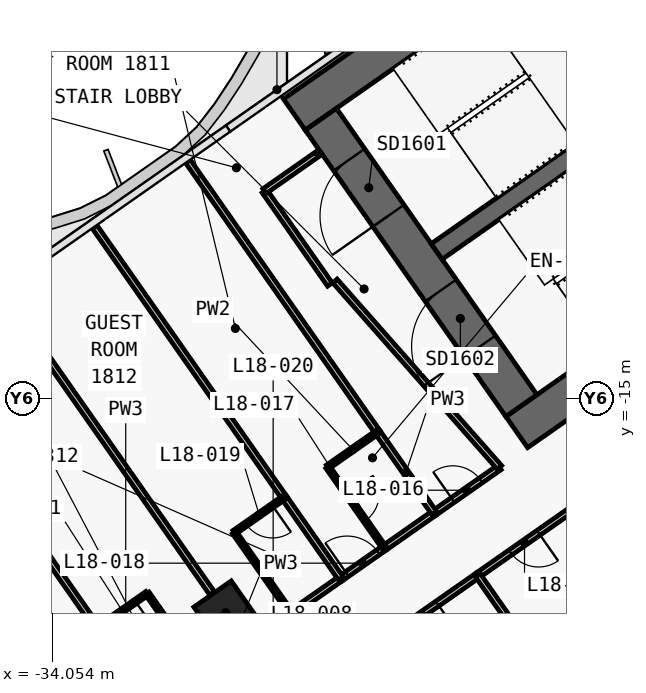
"""IFC4 building model, lengths in metres.
Left out: names, types, materials, properties, quantities, classifications, styles, units other than length and angle.
Written with IfcOpenShell. Run it as: python <this file> out.ifc"""

import sys

from ifc_helpers import new_model, si_unit, direction, frame, frame_2d, origin, origin_2d, place, context, subcontext, project, spatial, polyline, rectangle, outline, extrude, element, fill, save


model = new_model("IFC4")
c1 = context("Model", 3, precision=1e-05, world=origin(), true_north=direction((0.0, 1.0)))
c2 = subcontext(c1, "Body", "Model", "MODEL_VIEW")
j1 = project(units=[si_unit("LENGTHUNIT", "METRE"), si_unit("PLANEANGLEUNIT", "RADIAN")], contexts=[c1])
p1 = place(None, origin())
s1 = spatial("IfcSite", under=j1, at=p1, CompositionType="ELEMENT")
p2 = place(p1, origin())
s2 = spatial("IfcBuilding", under=s1, at=p2, CompositionType="ELEMENT")
p3 = place(p2, frame((0.0, 0.0, 90.5)))
s3 = spatial("IfcBuildingStorey", under=s2, at=p3, CompositionType="ELEMENT", Elevation=90.5)
p4 = place(p3, frame((0.037, 11.867, 0.0), z_axis=(0.0, 0.0, 1.0), x_axis=(-0.819155306259, -0.573571777746, 0.0)))
e1 = element("IfcWall", 1, at=p4, inside=s3, PredefinedType="SHEAR", context=c2, shape_type="SweptSolid", body=[
    extrude(outline(polyline([(33.837, 0.5), (0.7, 0.5), (0.0, -0.5), (33.837, -0.5), (33.837, 0.5)])), origin(), (0.0, 0.0, 1.0), 3.6),
])
p5 = place(p3, frame((0.037, -0.585, 0.0), z_axis=(0.0, 0.0, 1.0), x_axis=(-0.819157152511, -0.573569140985, 0.0)))
e2 = element("IfcWall", 2, at=p5, inside=s3, PredefinedType="SHEAR", context=c2, shape_type="SweptSolid", body=[
    extrude(outline(polyline([(26.695, 0.5), (0.7, 0.5), (0.0, -0.5), (26.695, -0.5), (26.695, 0.5)])), origin(), (0.0, 0.0, 1.0), 3.6),
])
p6 = place(p5, frame((2.995, 0.0, 0.0)))
e3 = element("IfcOpeningElement", 3, at=p6, cuts=e2, PredefinedType="OPENING", context=c2, shape_type="SweptSolid", body=[
    extrude(rectangle(XDim=2.4, YDim=2.1, at=frame_2d((1.2, 1.05))), frame((0.0, 0.51, 0.0), z_axis=(0.0, -1.0, 0.0), x_axis=(1.0, 0.0, 0.0)), (0.0, 0.0, 1.0), 1.02),
])
p7 = place(p5, frame((11.995, 0.0, 0.0)))
e4 = element("IfcOpeningElement", 4, at=p7, cuts=e2, PredefinedType="OPENING", context=c2, shape_type="SweptSolid", body=[
    extrude(rectangle(XDim=2.4, YDim=2.1, at=frame_2d((1.2, 1.05))), frame((0.0, 0.51, 0.0), z_axis=(0.0, -1.0, 0.0), x_axis=(1.0, 0.0, 0.0)), (0.0, 0.0, 1.0), 1.02),
])
p8 = place(p3, frame((-21.708, -15.2, 0.0), z_axis=(0.0, 0.0, 1.0), x_axis=(-0.573576324356, 0.819152122709, 0.0)))
e5 = element("IfcWall", 5, at=p8, inside=s3, PredefinedType="SHEAR", context=c2, shape_type="SweptSolid", body=[
    extrude(outline(polyline([(0.0, 0.5), (0.0, -0.5), (9.2, -0.5), (9.2, 0.5), (0.0, 0.5)])), origin(), (0.0, 0.0, 1.0), 3.6),
])
p9 = place(p8, frame((6.1, 0.0, 0.0)))
e6 = element("IfcOpeningElement", 6, at=p9, cuts=e5, PredefinedType="OPENING", context=c2, shape_type="SweptSolid", body=[
    extrude(rectangle(XDim=1.8, YDim=2.1, at=frame_2d((0.9, 1.05))), frame((0.0, 0.51, 0.0), z_axis=(0.0, -1.0, 0.0), x_axis=(1.0, 0.0, 0.0)), (0.0, 0.0, 1.0), 1.02),
])
p10 = place(p8, frame((1.9, 0.0, 0.0)))
e7 = element("IfcOpeningElement", 7, at=p10, cuts=e5, PredefinedType="OPENING", context=c2, shape_type="SweptSolid", body=[
    extrude(rectangle(XDim=1.8, YDim=2.1, at=frame_2d((0.9, 1.05))), frame((0.0, 0.51, 0.0), z_axis=(0.0, -1.0, 0.0), x_axis=(1.0, 0.0, 0.0)), (0.0, 0.0, 1.0), 1.02),
])
p11 = place(p3, frame((-2.638, 3.768, 0.0), z_axis=(0.0, 0.0, 1.0), x_axis=(-0.819148977158, -0.573580816643, 0.0)))
e8 = element("IfcWall", 8, at=p11, inside=s3, PredefinedType="SHEAR", context=c2, shape_type="SweptSolid", body=[
    extrude(outline(polyline([(26.0, 0.25), (0.0, 0.25), (0.0, -0.25), (26.0, -0.25), (26.0, 0.25)])), origin(), (0.0, 0.0, 1.0), 3.6),
])
p12 = place(p11, frame((1.169, 0.0, 0.0)))
e9 = element("IfcOpeningElement", 9, at=p12, cuts=e8, PredefinedType="OPENING", context=c2, shape_type="SweptSolid", body=[
    extrude(rectangle(XDim=1.1, YDim=2.1, at=frame_2d((0.55, 1.05))), frame((0.0, 0.26, 0.0), z_axis=(0.0, -1.0, 0.0), x_axis=(1.0, 0.0, 0.0)), (0.0, 0.0, 1.0), 0.52),
])
p13 = place(p11, frame((3.206, 0.0, 0.0)))
e10 = element("IfcOpeningElement", 10, at=p13, cuts=e8, PredefinedType="OPENING", context=c2, shape_type="SweptSolid", body=[
    extrude(rectangle(XDim=1.1, YDim=2.1, at=frame_2d((0.55, 1.05))), frame((0.0, 0.26, 0.0), z_axis=(0.0, -1.0, 0.0), x_axis=(1.0, 0.0, 0.0)), (0.0, 0.0, 1.0), 0.52),
])
p14 = place(p11, frame((5.244, 0.0, 0.0)))
e11 = element("IfcOpeningElement", 11, at=p14, cuts=e8, PredefinedType="OPENING", context=c2, shape_type="SweptSolid", body=[
    extrude(rectangle(XDim=1.1, YDim=2.1, at=frame_2d((0.55, 1.05))), frame((0.0, 0.26, 0.0), z_axis=(0.0, -1.0, 0.0), x_axis=(1.0, 0.0, 0.0)), (0.0, 0.0, 1.0), 0.52),
])
p15 = place(p11, frame((7.281, 0.0, 0.0)))
e12 = element("IfcOpeningElement", 12, at=p15, cuts=e8, PredefinedType="OPENING", context=c2, shape_type="SweptSolid", body=[
    extrude(rectangle(XDim=1.1, YDim=2.1, at=frame_2d((0.55, 1.05))), frame((0.0, 0.26, 0.0), z_axis=(0.0, -1.0, 0.0), x_axis=(1.0, 0.0, 0.0)), (0.0, 0.0, 1.0), 0.52),
])
p16 = place(p11, frame((9.688, 0.0, 0.0)))
e13 = element("IfcOpeningElement", 13, at=p16, cuts=e8, PredefinedType="OPENING", context=c2, shape_type="SweptSolid", body=[
    extrude(rectangle(XDim=1.1, YDim=2.1, at=frame_2d((0.55, 1.05))), frame((0.0, 0.26, 0.0), z_axis=(0.0, -1.0, 0.0), x_axis=(1.0, 0.0, 0.0)), (0.0, 0.0, 1.0), 0.52),
])
p17 = place(p11, frame((11.863, 0.0, 0.0)))
e14 = element("IfcOpeningElement", 14, at=p17, cuts=e8, PredefinedType="OPENING", context=c2, shape_type="SweptSolid", body=[
    extrude(rectangle(XDim=1.1, YDim=2.1, at=frame_2d((0.55, 1.05))), frame((0.0, 0.26, 0.0), z_axis=(0.0, -1.0, 0.0), x_axis=(1.0, 0.0, 0.0)), (0.0, 0.0, 1.0), 0.52),
])
p18 = place(p11, frame((14.038, 0.0, 0.0)))
e15 = element("IfcOpeningElement", 15, at=p18, cuts=e8, PredefinedType="OPENING", context=c2, shape_type="SweptSolid", body=[
    extrude(rectangle(XDim=1.1, YDim=2.1, at=frame_2d((0.55, 1.05))), frame((0.0, 0.26, 0.0), z_axis=(0.0, -1.0, 0.0), x_axis=(1.0, 0.0, 0.0)), (0.0, 0.0, 1.0), 0.52),
])
p19 = place(p11, frame((16.212, 0.0, 0.0)))
e16 = element("IfcOpeningElement", 16, at=p19, cuts=e8, PredefinedType="OPENING", context=c2, shape_type="SweptSolid", body=[
    extrude(rectangle(XDim=1.1, YDim=2.1, at=frame_2d((0.55, 1.05))), frame((0.0, 0.26, 0.0), z_axis=(0.0, -1.0, 0.0), x_axis=(1.0, 0.0, 0.0)), (0.0, 0.0, 1.0), 0.52),
])
p20 = place(p3, frame((-29.49, -20.649, 0.0), z_axis=(0.0, 0.0, 1.0), x_axis=(-0.819152044289, -0.573576436351, 0.0)))
e17 = element("IfcColumn", 17, at=p20, inside=s3, PredefinedType="COLUMN", context=c2, shape_type="SweptSolid", body=[
    extrude(rectangle(XDim=1.2, YDim=1.2, at=origin_2d()), origin(), (0.0, 0.0, 1.0), 3.6),
])
p21 = place(p3, frame((-24.003, -18.028, 0.0), z_axis=(0.0, 0.0, 1.0), x_axis=(0.819160859995, 0.573563846013, 0.0)))
e18 = element("IfcWall", 18, at=p21, inside=s3, PredefinedType="PARTITIONING", context=c2, shape_type="SweptSolid", body=[
    extrude(rectangle(XDim=2.098, YDim=0.15, at=frame_2d((1.049, 0.0))), origin(), (0.0, 0.0, 1.0), 3.32),
])
p22 = place(p21, frame((0.599, 0.0, 0.0)))
e19 = element("IfcOpeningElement", 19, at=p22, cuts=e18, PredefinedType="OPENING", context=c2, shape_type="SweptSolid", body=[
    extrude(rectangle(XDim=0.9, YDim=2.1, at=frame_2d((0.45, 1.05))), frame((0.0, 0.085, 0.0), z_axis=(0.0, -1.0, 0.0), x_axis=(1.0, 0.0, 0.0)), (0.0, 0.0, 1.0), 0.17),
])
p23 = place(p3, frame((-26.46, -19.748, 0.0), z_axis=(0.0, 0.0, 1.0), x_axis=(0.819199220913, 0.573509055252, 0.0)))
e20 = element("IfcWall", 20, at=p23, inside=s3, PredefinedType="PARTITIONING", context=c2, shape_type="SweptSolid", body=[
    extrude(rectangle(XDim=1.403, YDim=0.15, at=frame_2d((0.702, 0.0))), origin(), (0.0, 0.0, 1.0), 3.32),
])
p24 = place(p23, frame((0.202, 0.0, 0.0)))
e21 = element("IfcOpeningElement", 21, at=p24, cuts=e20, PredefinedType="OPENING", context=c2, shape_type="SweptSolid", body=[
    extrude(rectangle(XDim=1.0, YDim=2.1, at=frame_2d((0.5, 1.05))), frame((0.0, 0.085, 0.0), z_axis=(0.0, -1.0, 0.0), x_axis=(1.0, 0.0, 0.0)), (0.0, 0.0, 1.0), 0.17),
])
p25 = place(p3, frame((-25.313, -18.945, 0.0), z_axis=(0.0, 0.0, 1.0), x_axis=(0.819189013667, 0.573523634986, 0.0)))
e22 = element("IfcWall", 22, at=p25, inside=s3, PredefinedType="PARTITIONING", context=c2, shape_type="SweptSolid", body=[
    extrude(rectangle(XDim=1.604, YDim=0.15, at=frame_2d((0.802, 0.0))), origin(), (0.0, 0.0, 1.0), 3.32),
])
p26 = place(p3, frame((-27.768, -20.664, 0.0), z_axis=(0.0, 0.0, 1.0), x_axis=(-0.81914197737, -0.573590813132, 0.0)))
e23 = element("IfcWall", 23, at=p26, inside=s3, PredefinedType="PARTITIONING", context=c2, shape_type="SweptSolid", body=[
    extrude(rectangle(XDim=1.403, YDim=0.15, at=frame_2d((0.701, 0.0))), origin(), (0.0, 0.0, 1.0), 2.6),
])
p27 = place(p26, frame((0.15, 0.0, 0.0)))
e24 = element("IfcOpeningElement", 24, at=p27, cuts=e23, PredefinedType="OPENING", context=c2, shape_type="SweptSolid", body=[
    extrude(rectangle(XDim=0.85, YDim=2.1, at=frame_2d((0.425, 1.05))), frame((0.0, 0.085, 0.0), z_axis=(0.0, -1.0, 0.0), x_axis=(1.0, 0.0, 0.0)), (0.0, 0.0, 1.0), 0.17),
])
p28 = place(p3, frame((-27.771, -20.666, 0.0), z_axis=(0.0, 0.0, 1.0), x_axis=(0.819189013667, 0.573523634986, 0.0)))
e25 = element("IfcWall", 25, at=p28, inside=s3, PredefinedType="PARTITIONING", context=c2, shape_type="SweptSolid", body=[
    extrude(rectangle(XDim=1.604, YDim=0.15, at=frame_2d((0.802, 0.0))), origin(), (0.0, 0.0, 1.0), 3.32),
])
p29 = place(p3, frame((-20.395, -17.943, 0.0), z_axis=(0.0, 0.0, 1.0), x_axis=(-0.819128818764, -0.573609604409, 0.0)))
e26 = element("IfcWall", 26, at=p29, inside=s3, PredefinedType="PARTITIONING", context=c2, shape_type="SweptSolid", body=[
    extrude(rectangle(XDim=3.004, YDim=0.15, at=frame_2d((1.502, 0.0))), origin(), (0.0, 0.0, 1.0), 2.6),
])
p30 = place(p29, frame((1.052, 0.0, 0.0)))
e27 = element("IfcOpeningElement", 27, at=p30, cuts=e26, PredefinedType="OPENING", context=c2, shape_type="SweptSolid", body=[
    extrude(rectangle(XDim=0.9, YDim=2.1, at=frame_2d((0.45, 1.05))), frame((0.0, 0.085, 0.0), z_axis=(0.0, -1.0, 0.0), x_axis=(1.0, 0.0, 0.0)), (0.0, 0.0, 1.0), 0.17),
])
p31 = place(p3, frame((-22.852, -19.664, 0.0), z_axis=(0.0, 0.0, 1.0), x_axis=(-0.819145961204, -0.573585123798, 0.0)))
e28 = element("IfcWall", 28, at=p31, inside=s3, PredefinedType="PARTITIONING", context=c2, shape_type="SweptSolid", body=[
    extrude(rectangle(XDim=3.603, YDim=0.15, at=frame_2d((1.802, 0.0))), origin(), (0.0, 0.0, 1.0), 3.32),
])
p32 = place(p31, frame((1.302, 0.0, 0.0)))
e29 = element("IfcOpeningElement", 29, at=p32, cuts=e28, PredefinedType="OPENING", context=c2, shape_type="SweptSolid", body=[
    extrude(rectangle(XDim=1.0, YDim=2.1, at=frame_2d((0.5, 1.05))), frame((0.0, 0.085, 0.0), z_axis=(0.0, -1.0, 0.0), x_axis=(1.0, 0.0, 0.0)), (0.0, 0.0, 1.0), 0.17),
])
p33 = place(p3, frame((-26.746, -12.014, 0.0), z_axis=(0.0, 0.0, 1.0), x_axis=(-0.573560650686, 0.819163097304, 0.0)))
e30 = element("IfcWall", 30, at=p33, inside=s3, PredefinedType="PARTITIONING", context=c2, shape_type="SweptSolid", body=[
    extrude(rectangle(XDim=3.0, YDim=0.15, at=frame_2d((1.5, 0.0))), origin(), (0.0, 0.0, 1.0), 3.32),
])
p34 = place(p3, frame((-28.467, -9.556, 0.0), z_axis=(0.0, 0.0, 1.0), x_axis=(0.819109000826, 0.573637903879, 0.0)))
e31 = element("IfcWall", 31, at=p34, inside=s3, PredefinedType="PARTITIONING", context=c2, shape_type="SweptSolid", body=[
    extrude(rectangle(XDim=1.68, YDim=0.15, at=frame_2d((0.84, 0.0))), origin(), (0.0, 0.0, 1.0), 3.32),
])
p35 = place(p3, frame((-22.284, -16.827, 0.0), z_axis=(0.0, 0.0, 1.0), x_axis=(-0.661545117561, 0.749905365651, 0.0)))
e32 = element("IfcWall", 32, at=p35, inside=s3, PredefinedType="PARTITIONING", context=c2, shape_type="SweptSolid", body=[
    extrude(rectangle(XDim=6.543, YDim=0.15, at=frame_2d((3.271, 0.0))), origin(), (0.0, 0.0, 1.0), 2.6),
])
p36 = place(p3, frame((-25.492, -15.897, 0.0), z_axis=(0.0, 0.0, 1.0), x_axis=(-0.573579093502, 0.819150183725, 0.0)))
e33 = element("IfcWall", 33, at=p36, inside=s3, PredefinedType="PARTITIONING", context=c2, shape_type="SweptSolid", body=[
    extrude(rectangle(XDim=8.701, YDim=0.15, at=frame_2d((4.351, 0.0))), origin(), (0.0, 0.0, 1.0), 2.6),
])
p37 = place(p3, frame((-24.001, -18.026, 0.0), z_axis=(0.0, 0.0, 1.0), x_axis=(-0.573588285102, 0.819143747577, 0.0)))
e34 = element("IfcWall", 34, at=p37, inside=s3, PredefinedType="PARTITIONING", context=c2, shape_type="SweptSolid", body=[
    extrude(rectangle(XDim=2.602, YDim=0.15, at=frame_2d((1.301, 0.0))), origin(), (0.0, 0.0, 1.0), 2.6),
])
p38 = place(p3, frame((-25.493, -15.896, 0.0), z_axis=(0.0, 0.0, 1.0), x_axis=(-0.819059844958, -0.573708088123, 0.0)))
e35 = element("IfcWall", 35, at=p38, inside=s3, PredefinedType="PARTITIONING", context=c2, shape_type="SweptSolid", body=[
    extrude(rectangle(XDim=1.6, YDim=0.12, at=frame_2d((0.8, 0.0))), origin(), (0.0, 0.0, 1.0), 3.32),
])
p39 = place(p3, frame((-26.804, -16.815, 0.0), z_axis=(0.0, 0.0, 1.0), x_axis=(0.573582085028, -0.819148089014, 0.0)))
e36 = element("IfcWall", 36, at=p39, inside=s3, PredefinedType="PARTITIONING", context=c2, shape_type="SweptSolid", body=[
    extrude(rectangle(XDim=2.6, YDim=0.12, at=frame_2d((1.3, 0.0))), origin(), (0.0, 0.0, 1.0), 2.6),
])
p40 = place(p39, frame((0.875, 0.0, 0.0)))
e37 = element("IfcOpeningElement", 37, at=p40, cuts=e36, PredefinedType="OPENING", context=c2, shape_type="SweptSolid", body=[
    extrude(rectangle(XDim=0.85, YDim=2.05, at=frame_2d((0.425, 1.025))), frame((0.0, 0.07, 0.0), z_axis=(0.0, -1.0, 0.0), x_axis=(1.0, 0.0, 0.0)), (0.0, 0.0, 1.0), 0.14),
])
p41 = place(p3, frame((-27.949, -17.618, 0.0), z_axis=(0.0, 0.0, 1.0), x_axis=(-0.573579093502, 0.819150183725, 0.0)))
e38 = element("IfcWall", 38, at=p41, inside=s3, PredefinedType="PARTITIONING", context=c2, shape_type="SweptSolid", body=[
    extrude(rectangle(XDim=8.701, YDim=0.15, at=frame_2d((4.351, 0.0))), origin(), (0.0, 0.0, 1.0), 2.6),
])
p42 = place(p3, frame((-26.458, -19.747, 0.0), z_axis=(0.0, 0.0, 1.0), x_axis=(-0.573544201094, 0.819174614714, 0.0)))
e39 = element("IfcWall", 39, at=p42, inside=s3, PredefinedType="PARTITIONING", context=c2, shape_type="SweptSolid", body=[
    extrude(rectangle(XDim=2.602, YDim=0.15, at=frame_2d((1.301, 0.0))), origin(), (0.0, 0.0, 1.0), 2.6),
])
p43 = place(p3, frame((-27.95, -17.617, 0.0), z_axis=(0.0, 0.0, 1.0), x_axis=(-0.819253425856, -0.573431621227, 0.0)))
e40 = element("IfcWall", 40, at=p43, inside=s3, PredefinedType="PARTITIONING", context=c2, shape_type="SweptSolid", body=[
    extrude(rectangle(XDim=1.6, YDim=0.12, at=frame_2d((0.8, 0.0))), origin(), (0.0, 0.0, 1.0), 3.32),
])
p44 = place(p43, frame((0.375, 0.0, 0.0)))
e41 = element("IfcOpeningElement", 41, at=p44, cuts=e40, PredefinedType="OPENING", context=c2, shape_type="SweptSolid", body=[
    extrude(rectangle(XDim=0.85, YDim=2.05, at=frame_2d((0.425, 1.025))), frame((0.0, 0.07, 0.0), z_axis=(0.0, -1.0, 0.0), x_axis=(1.0, 0.0, 0.0)), (0.0, 0.0, 1.0), 0.14),
])
p45 = place(p3, frame((-29.261, -18.536, 0.0), z_axis=(0.0, 0.0, 1.0), x_axis=(0.573537965655, -0.819178980414, 0.0)))
e42 = element("IfcWall", 42, at=p45, inside=s3, PredefinedType="PARTITIONING", context=c2, shape_type="SweptSolid", body=[
    extrude(rectangle(XDim=2.6, YDim=0.12, at=frame_2d((1.3, 0.0))), origin(), (0.0, 0.0, 1.0), 2.6),
])
p46 = place(p3, frame((-29.845, -20.141, 0.0), z_axis=(0.0, 0.0, 1.0), x_axis=(-0.573558725113, 0.819164445546, 0.0)))
e43 = element("IfcWall", 43, at=p46, inside=s3, PredefinedType="PARTITIONING", context=c2, shape_type="SweptSolid", body=[
    extrude(rectangle(XDim=9.01, YDim=0.15, at=frame_2d((4.505, 0.0))), origin(), (0.0, 0.0, 1.0), 2.6),
])
p47 = place(p3, frame((-30.062, -22.27, 0.0), z_axis=(0.0, 0.0, 1.0), x_axis=(-0.573537965655, 0.819178980414, 0.0)))
e44 = element("IfcWall", 44, at=p47, inside=s3, PredefinedType="PARTITIONING", context=c2, shape_type="SweptSolid", body=[
    extrude(rectangle(XDim=2.6, YDim=0.12, at=frame_2d((1.3, 0.0))), origin(), (0.0, 0.0, 1.0), 2.6),
])
p48 = place(p3, frame((-31.555, -20.14, 0.0), z_axis=(0.0, 0.0, 1.0), x_axis=(-0.819131543282, -0.57360571371, 0.0)))
e45 = element("IfcWall", 45, at=p48, inside=s3, PredefinedType="PARTITIONING", context=c2, shape_type="SweptSolid", body=[
    extrude(rectangle(XDim=1.6, YDim=0.12, at=frame_2d((0.8, 0.0))), origin(), (0.0, 0.0, 1.0), 3.32),
])
p49 = place(p48, frame((0.375, 0.0, 0.0)))
e46 = element("IfcOpeningElement", 46, at=p49, cuts=e45, PredefinedType="OPENING", context=c2, shape_type="SweptSolid", body=[
    extrude(rectangle(XDim=0.85, YDim=2.05, at=frame_2d((0.425, 1.025))), frame((0.0, 0.07, 0.0), z_axis=(0.0, -1.0, 0.0), x_axis=(1.0, 0.0, 0.0)), (0.0, 0.0, 1.0), 0.14),
])
p50 = place(p3, frame((-32.979, -20.896, 0.0), z_axis=(0.0, 0.0, 1.0), x_axis=(-0.573576058406, 0.819152308929, 0.0)))
e47 = element("IfcWall", 47, at=p50, inside=s3, PredefinedType="PARTITIONING", context=c2, shape_type="SweptSolid", body=[
    extrude(rectangle(XDim=8.501, YDim=0.15, at=frame_2d((4.25, 0.0))), origin(), (0.0, 0.0, 1.0), 2.5),
])
p51 = place(p3, frame((-18.667, -25.645, 0.0), z_axis=(0.0, 0.0, 1.0), x_axis=(-0.573572324301, 0.819154923562, 0.0)))
e48 = element("IfcWall", 48, at=p51, inside=s3, PredefinedType="PARTITIONING", context=c2, shape_type="SweptSolid", body=[
    extrude(rectangle(XDim=7.3, YDim=0.15, at=frame_2d((3.65, 0.0))), origin(), (0.0, 0.0, 1.0), 2.5),
])
p52 = place(p9, origin())
e49 = element("IfcDoor", 49, at=p52, inside=s3, OperationType="DOUBLE_DOOR_SINGLE_SWING", PredefinedType="DOOR", context=c2, shape_type="SweptSolid", body=[
    extrude(rectangle(XDim=1.8, YDim=2.1, at=frame_2d((0.9, 1.05))), frame((0.0, 0.025, 0.0), z_axis=(0.0, -1.0, 0.0), x_axis=(1.0, 0.0, 0.0)), (0.0, 0.0, 1.0), 0.05),
])
fill(e6, e49)
p53 = place(p10, origin())
e50 = element("IfcDoor", 50, at=p53, inside=s3, OperationType="DOUBLE_DOOR_SINGLE_SWING", PredefinedType="DOOR", context=c2, shape_type="SweptSolid", body=[
    extrude(rectangle(XDim=1.8, YDim=2.1, at=frame_2d((0.9, 1.05))), frame((0.0, 0.025, 0.0), z_axis=(0.0, -1.0, 0.0), x_axis=(1.0, 0.0, 0.0)), (0.0, 0.0, 1.0), 0.05),
])
fill(e7, e50)
p54 = place(p30, origin())
e51 = element("IfcDoor", 51, at=p54, inside=s3, OperationType="SINGLE_SWING_LEFT", PredefinedType="DOOR", context=c2, shape_type="SweptSolid", body=[
    extrude(rectangle(XDim=0.9, YDim=2.1, at=frame_2d((0.45, 1.05))), frame((0.0, 0.025, 0.0), z_axis=(0.0, -1.0, 0.0), x_axis=(1.0, 0.0, 0.0)), (0.0, 0.0, 1.0), 0.05),
])
fill(e27, e51)
p55 = place(p32, origin())
e52 = element("IfcDoor", 52, at=p55, inside=s3, OperationType="SINGLE_SWING_RIGHT", PredefinedType="DOOR", context=c2, shape_type="SweptSolid", body=[
    extrude(rectangle(XDim=1.0, YDim=2.1, at=frame_2d((0.5, 1.05))), frame((0.0, 0.025, 0.0), z_axis=(0.0, -1.0, 0.0), x_axis=(1.0, 0.0, 0.0)), (0.0, 0.0, 1.0), 0.05),
])
fill(e29, e52)
p56 = place(p22, origin())
e53 = element("IfcDoor", 53, at=p56, inside=s3, OperationType="SINGLE_SWING_RIGHT", PredefinedType="DOOR", context=c2, shape_type="SweptSolid", body=[
    extrude(rectangle(XDim=0.9, YDim=2.1, at=frame_2d((0.45, 1.05))), frame((0.0, 0.025, 0.0), z_axis=(0.0, -1.0, 0.0), x_axis=(1.0, 0.0, 0.0)), (0.0, 0.0, 1.0), 0.05),
])
fill(e19, e53)
p57 = place(p40, origin())
e54 = element("IfcDoor", 54, at=p57, inside=s3, OperationType="SINGLE_SWING_RIGHT", PredefinedType="DOOR", context=c2, shape_type="SweptSolid", body=[
    extrude(rectangle(XDim=0.85, YDim=2.05, at=frame_2d((0.425, 1.025))), frame((0.0, 0.025, 0.0), z_axis=(0.0, -1.0, 0.0), x_axis=(1.0, 0.0, 0.0)), (0.0, 0.0, 1.0), 0.05),
])
fill(e37, e54)
p58 = place(p24, origin())
e55 = element("IfcDoor", 55, at=p58, inside=s3, OperationType="SINGLE_SWING_LEFT", PredefinedType="DOOR", context=c2, shape_type="SweptSolid", body=[
    extrude(rectangle(XDim=1.0, YDim=2.1, at=frame_2d((0.5, 1.05))), frame((0.0, 0.025, 0.0), z_axis=(0.0, -1.0, 0.0), x_axis=(1.0, 0.0, 0.0)), (0.0, 0.0, 1.0), 0.05),
])
fill(e21, e55)
p59 = place(p44, origin())
e56 = element("IfcDoor", 56, at=p59, inside=s3, OperationType="SINGLE_SWING_LEFT", PredefinedType="DOOR", context=c2, shape_type="SweptSolid", body=[
    extrude(rectangle(XDim=0.85, YDim=2.05, at=frame_2d((0.425, 1.025))), frame((0.0, 0.025, 0.0), z_axis=(0.0, -1.0, 0.0), x_axis=(1.0, 0.0, 0.0)), (0.0, 0.0, 1.0), 0.05),
])
fill(e41, e56)
p60 = place(p49, origin())
e57 = element("IfcDoor", 57, at=p60, inside=s3, OperationType="SINGLE_SWING_LEFT", PredefinedType="DOOR", context=c2, shape_type="SweptSolid", body=[
    extrude(rectangle(XDim=0.85, YDim=2.05, at=frame_2d((0.425, 1.025))), frame((0.0, 0.025, 0.0), z_axis=(0.0, -1.0, 0.0), x_axis=(1.0, 0.0, 0.0)), (0.0, 0.0, 1.0), 0.05),
])
fill(e46, e57)
save(model, sys.argv[1])
